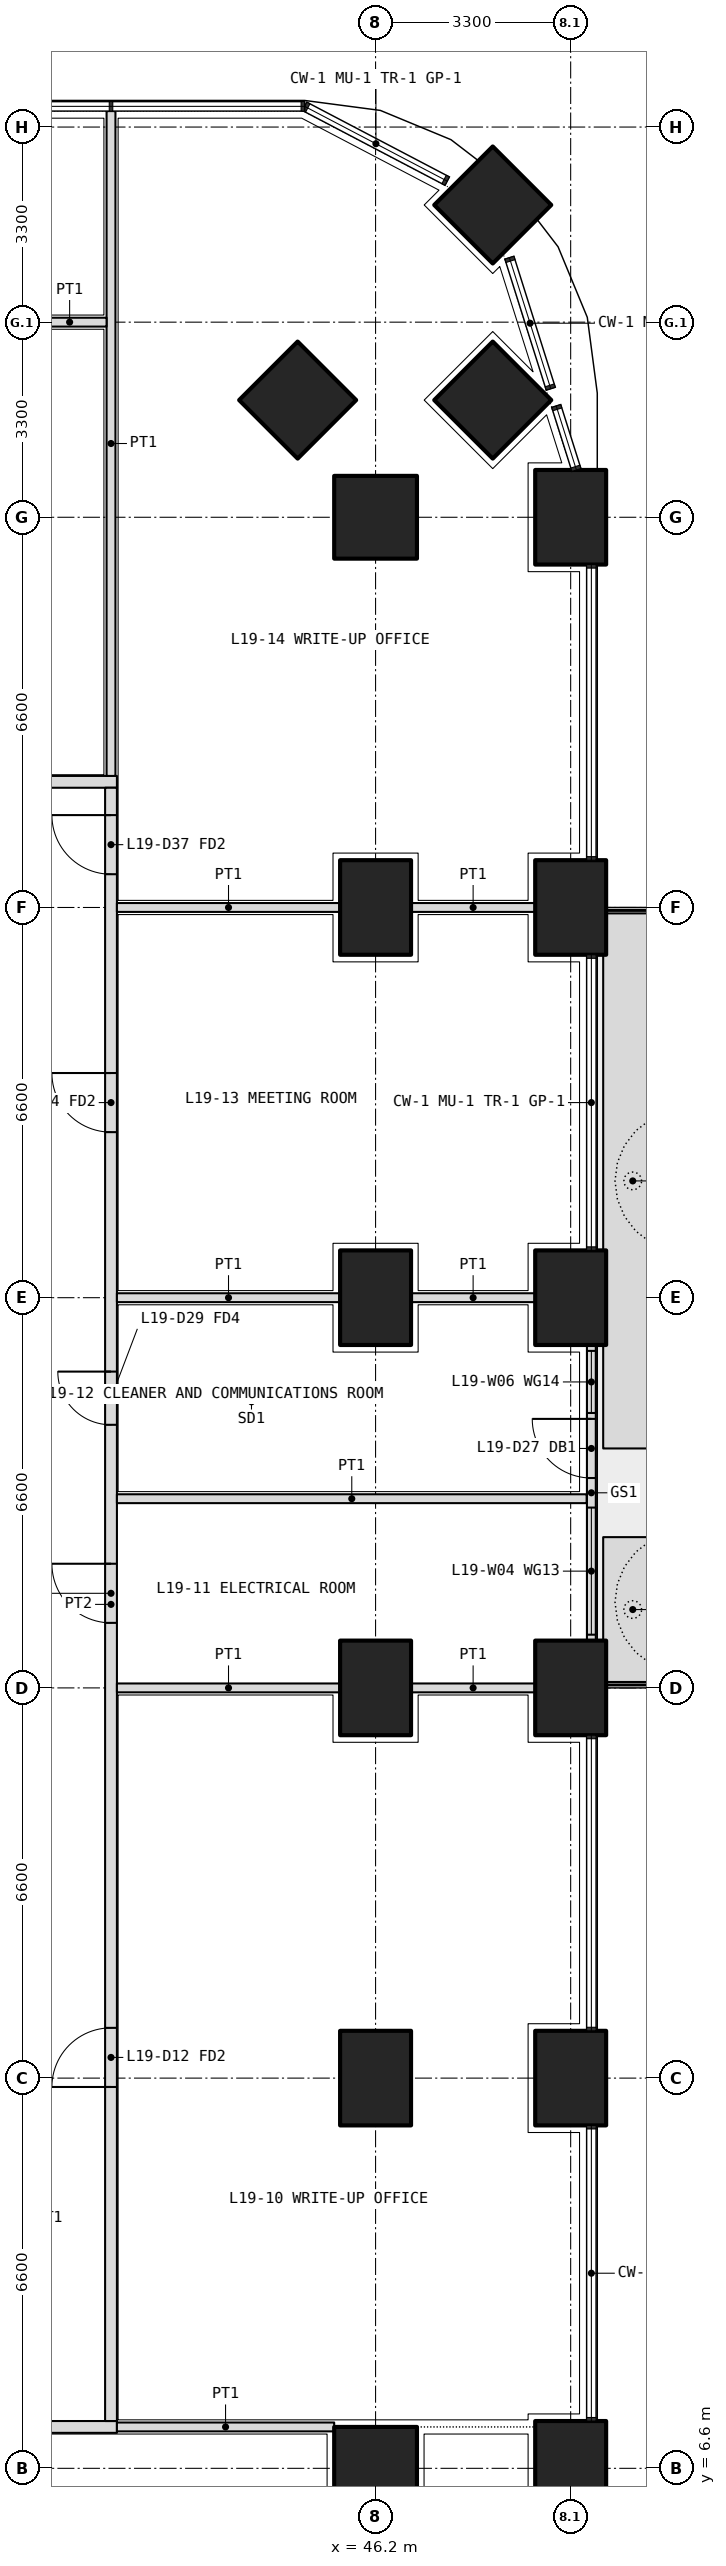
"""IFC4 building model, lengths in metres.
Left out: names, types, materials, properties, quantities, classifications, styles, units other than length and angle.
Written with IfcOpenShell. Run it as: python <this file> out.ifc"""

import sys

from ifc_helpers import new_model, si_unit, direction, frame, frame_2d, origin, origin_2d, place, context, subcontext, project, spatial, polyline, rectangle, outline, extrude, element, fill, save


model = new_model("IFC4")
c1 = context("Model", 3, precision=1e-05, world=origin(), true_north=direction((0.0, 1.0)))
c2 = subcontext(c1, "Body", "Model", "MODEL_VIEW")
j1 = project(units=[si_unit("LENGTHUNIT", "METRE"), si_unit("PLANEANGLEUNIT", "RADIAN")], contexts=[c1])
p1 = place(None, origin())
s1 = spatial("IfcSite", under=j1, at=p1, CompositionType="ELEMENT")
p2 = place(p1, origin())
s2 = spatial("IfcBuilding", under=s1, at=p2, CompositionType="ELEMENT")
p3 = place(p2, frame((0.0, 0.0, 86.4)))
s3 = spatial("IfcBuildingStorey", under=s2, at=p3, CompositionType="ELEMENT", Elevation=86.4)
p4 = place(p3, frame((48.182, 44.882, 0.0), z_axis=(0.0, 0.0, 1.0), x_axis=(0.707106781187, 0.707106781187, 0.0)))
e1 = element("IfcColumn", 1, at=p4, inside=s3, PredefinedType="COLUMN", context=c2, shape_type="SweptSolid", body=[
    extrude(rectangle(XDim=1.4, YDim=1.4, at=origin_2d()), origin(), (0.0, 0.0, 1.0), 4.2),
])
for number, where, z_axis, x_axis in (
    (2, (49.5, 6.6, 0.0), (0.0, 0.0, 1.0), (0.0, 1.0, 0.0)),
    (3, (49.5, 13.2, 0.0), (0.0, 0.0, 1.0), (0.0, 1.0, 0.0)),
    (4, (49.5, 19.8, 0.0), (0.0, 0.0, 1.0), (0.0, 1.0, 0.0)),
    (5, (49.5, 26.4, 0.0), (0.0, 0.0, 1.0), (0.0, 1.0, 0.0)),
    (6, (49.5, 33.0, 0.0), (0.0, 0.0, 1.0), (0.0, 1.0, 0.0)),
    (7, (49.5, 39.6, 0.0), (0.0, 0.0, 1.0), (0.0, 1.0, 0.0)),
):
    element("IfcColumn", number, at=place(p3, frame(where, z_axis=z_axis, x_axis=x_axis)), inside=s3, PredefinedType="COLUMN", context=c2, shape_type="SweptSolid", body=[
        extrude(rectangle(XDim=1.6, YDim=1.2, at=origin_2d()), origin(), (0.0, 0.0, 1.0), 4.2),
    ])
for number, where, z_axis, x_axis in (
    (8, (46.2, 6.6, 0.0), (0.0, 0.0, 1.0), (1.0, 0.0, 0.0)),
    (9, (46.2, 39.6, 0.0), (0.0, 0.0, 1.0), (1.0, 0.0, 0.0)),
    (10, (48.182, 41.582, 0.0), (0.0, 0.0, 1.0), (0.707, 0.707, 0.0)),
    (11, (44.882, 41.582, 0.0), (0.0, 0.0, 1.0), (0.707, 0.707, 0.0)),
):
    element("IfcColumn", number, at=place(p3, frame(where, z_axis=z_axis, x_axis=x_axis)), inside=s3, PredefinedType="COLUMN", context=c2, shape_type="SweptSolid", body=[
        extrude(rectangle(XDim=1.4, YDim=1.4, at=origin_2d()), origin(), (0.0, 0.0, 1.0), 4.2),
    ])
for number, where, z_axis, x_axis in (
    (12, (46.2, 13.2, 0.0), (0.0, 0.0, 1.0), (0.0, 1.0, 0.0)),
    (13, (46.2, 19.8, 0.0), (0.0, 0.0, 1.0), (0.0, 1.0, 0.0)),
    (14, (46.2, 26.4, 0.0), (0.0, 0.0, 1.0), (0.0, 1.0, 0.0)),
    (15, (46.2, 33.0, 0.0), (0.0, 0.0, 1.0), (0.0, 1.0, 0.0)),
):
    element("IfcColumn", number, at=place(p3, frame(where, z_axis=z_axis, x_axis=x_axis)), inside=s3, PredefinedType="COLUMN", context=c2, shape_type="SweptSolid", body=[
        extrude(rectangle(XDim=1.6, YDim=1.2, at=origin_2d()), origin(), (0.0, 0.0, 1.0), 4.2),
    ])
p5 = place(p3, origin())
e16 = element("IfcWall", 16, at=p5, inside=s3, PredefinedType="USERDEFINED", context=c2, shape_type="SweptSolid", body=[
    extrude(outline(polyline([(50.05, 19.9), (51.05, 19.9), (51.05, 22.35), (50.05, 22.35), (50.05, 19.9)]), holes=[polyline([(50.2, 20.05), (50.9, 20.05), (50.9, 22.2), (50.2, 22.2), (50.2, 20.05)])]), origin(), (0.0, 0.0, 1.0), 1.05),
])
p6 = place(p3, origin())
e17 = element("IfcWall", 17, at=p6, inside=s3, PredefinedType="USERDEFINED", context=c2, shape_type="SweptSolid", body=[
    extrude(outline(polyline([(50.05, 23.85), (51.05, 23.85), (51.05, 32.9), (50.05, 32.9), (50.05, 23.85)]), holes=[polyline([(50.2, 24.0), (50.9, 24.0), (50.9, 32.75), (50.2, 32.75), (50.2, 24.0)])]), origin(), (0.0, 0.0, 1.0), 1.05),
])
p7 = place(p3, frame((49.85, 20.6, 0.0), z_axis=(0.0, 0.0, 1.0), x_axis=(0.0, 1.0, 0.0)))
e18 = element("IfcWall", 18, at=p7, inside=s3, PredefinedType="SOLIDWALL", context=c2, shape_type="SweptSolid", body=[
    extrude(rectangle(XDim=5.0, YDim=0.15, at=frame_2d((2.5, 0.0))), origin(), (0.0, 0.0, 1.0), 2.7),
])
p8 = place(p7, frame((2.75, 0.0, 0.0)))
e19 = element("IfcOpeningElement", 19, at=p8, cuts=e18, PredefinedType="OPENING", context=c2, shape_type="SweptSolid", body=[
    extrude(rectangle(XDim=1.0, YDim=2.4, at=frame_2d((0.5, 1.2))), frame((0.0, 0.085, 0.0), z_axis=(0.0, -1.0, 0.0), x_axis=(1.0, 0.0, 0.0)), (0.0, 0.0, 1.0), 0.17),
])
p9 = place(p7, frame((0.1, 0.0, 0.1)))
e20 = element("IfcOpeningElement", 20, at=p9, cuts=e18, PredefinedType="OPENING", context=c2, shape_type="SweptSolid", body=[
    extrude(rectangle(XDim=2.15, YDim=2.3, at=frame_2d((1.075, 1.15))), frame((0.0, 0.085, 0.0), z_axis=(0.0, -1.0, 0.0), x_axis=(1.0, 0.0, 0.0)), (0.0, 0.0, 1.0), 0.17),
])
p10 = place(p7, frame((3.85, 0.0, 0.1)))
e21 = element("IfcOpeningElement", 21, at=p10, cuts=e18, PredefinedType="OPENING", context=c2, shape_type="SweptSolid", body=[
    extrude(rectangle(XDim=1.05, YDim=2.3, at=frame_2d((0.525, 1.15))), frame((0.0, 0.085, 0.0), z_axis=(0.0, -1.0, 0.0), x_axis=(1.0, 0.0, 0.0)), (0.0, 0.0, 1.0), 0.17),
])
p11 = place(p3, frame((26.4, 7.3, 0.0), z_axis=(0.0, 0.0, 1.0), x_axis=(1.0, 0.0, 0.0)))
e22 = element("IfcWall", 22, at=p11, inside=s3, PredefinedType="PARTITIONING", context=c2, shape_type="SweptSolid", body=[
    extrude(rectangle(XDim=15.425, YDim=0.2, at=frame_2d((7.712, 0.0))), origin(), (0.0, 0.0, 1.0), 2.85),
])
p12 = place(p11, frame((7.163, 0.0, 0.0)))
e23 = element("IfcOpeningElement", 23, at=p12, cuts=e22, PredefinedType="OPENING", context=c2, shape_type="SweptSolid", body=[
    extrude(rectangle(XDim=1.0, YDim=2.1, at=frame_2d((0.5, 1.05))), frame((0.0, 0.11, 0.0), z_axis=(0.0, -1.0, 0.0), x_axis=(1.0, 0.0, 0.0)), (0.0, 0.0, 1.0), 0.22),
])
p13 = place(p3, frame((10.975, 35.125, 0.0), z_axis=(0.0, 0.0, 1.0), x_axis=(1.0, 0.0, 0.0)))
e24 = element("IfcWall", 24, at=p13, inside=s3, PredefinedType="PARTITIONING", context=c2, shape_type="SweptSolid", body=[
    extrude(rectangle(XDim=30.85, YDim=0.2, at=frame_2d((15.425, 0.0))), origin(), (0.0, 0.0, 1.0), 2.85),
])
p14 = place(p13, frame((3.962, 0.0, 0.0)))
e25 = element("IfcOpeningElement", 25, at=p14, cuts=e24, PredefinedType="OPENING", context=c2, shape_type="SweptSolid", body=[
    extrude(rectangle(XDim=1.0, YDim=2.1, at=frame_2d((0.5, 1.05))), frame((0.0, 0.11, 0.0), z_axis=(0.0, -1.0, 0.0), x_axis=(1.0, 0.0, 0.0)), (0.0, 0.0, 1.0), 0.22),
])
p15 = place(p13, frame((9.975, 0.0, 0.0)))
e26 = element("IfcOpeningElement", 26, at=p15, cuts=e24, PredefinedType="OPENING", context=c2, shape_type="SweptSolid", body=[
    extrude(rectangle(XDim=1.0, YDim=2.1, at=frame_2d((0.5, 1.05))), frame((0.0, 0.11, 0.0), z_axis=(0.0, -1.0, 0.0), x_axis=(1.0, 0.0, 0.0)), (0.0, 0.0, 1.0), 0.22),
])
p16 = place(p13, frame((14.825, 0.0, 0.0)))
e27 = element("IfcOpeningElement", 27, at=p16, cuts=e24, PredefinedType="OPENING", context=c2, shape_type="SweptSolid", body=[
    extrude(rectangle(XDim=1.2, YDim=2.1, at=frame_2d((0.6, 1.05))), frame((0.0, 0.11, 0.0), z_axis=(0.0, -1.0, 0.0), x_axis=(1.0, 0.0, 0.0)), (0.0, 0.0, 1.0), 0.22),
])
p17 = place(p13, frame((24.238, 0.0, 0.0)))
e28 = element("IfcOpeningElement", 28, at=p17, cuts=e24, PredefinedType="OPENING", context=c2, shape_type="SweptSolid", body=[
    extrude(rectangle(XDim=1.0, YDim=2.1, at=frame_2d((0.5, 1.05))), frame((0.0, 0.11, 0.0), z_axis=(0.0, -1.0, 0.0), x_axis=(1.0, 0.0, 0.0)), (0.0, 0.0, 1.0), 0.22),
])
p18 = place(p3, frame((41.725, 7.4, 0.0), z_axis=(0.0, 0.0, 1.0), x_axis=(0.0, 1.0, 0.0)))
e29 = element("IfcWall", 29, at=p18, inside=s3, PredefinedType="PARTITIONING", context=c2, shape_type="SweptSolid", body=[
    extrude(rectangle(XDim=27.625, YDim=0.2, at=frame_2d((13.812, 0.0))), origin(), (0.0, 0.0, 1.0), 2.85),
])
p19 = place(p18, frame((5.65, 0.0, 0.0)))
e30 = element("IfcOpeningElement", 30, at=p19, cuts=e29, PredefinedType="OPENING", context=c2, shape_type="SweptSolid", body=[
    extrude(rectangle(XDim=1.0, YDim=2.1, at=frame_2d((0.5, 1.05))), frame((0.0, 0.11, 0.0), z_axis=(0.0, -1.0, 0.0), x_axis=(1.0, 0.0, 0.0)), (0.0, 0.0, 1.0), 0.22),
])
p20 = place(p18, frame((13.5, 0.0, 0.0)))
e31 = element("IfcOpeningElement", 31, at=p20, cuts=e29, PredefinedType="OPENING", context=c2, shape_type="SweptSolid", body=[
    extrude(rectangle(XDim=1.0, YDim=2.1, at=frame_2d((0.5, 1.05))), frame((0.0, 0.11, 0.0), z_axis=(0.0, -1.0, 0.0), x_axis=(1.0, 0.0, 0.0)), (0.0, 0.0, 1.0), 0.22),
])
p21 = place(p18, frame((16.85, 0.0, 0.0)))
e32 = element("IfcOpeningElement", 32, at=p21, cuts=e29, PredefinedType="OPENING", context=c2, shape_type="SweptSolid", body=[
    extrude(rectangle(XDim=0.9, YDim=2.1, at=frame_2d((0.45, 1.05))), frame((0.0, 0.11, 0.0), z_axis=(0.0, -1.0, 0.0), x_axis=(1.0, 0.0, 0.0)), (0.0, 0.0, 1.0), 0.22),
])
p22 = place(p18, frame((21.8, 0.0, 0.0)))
e33 = element("IfcOpeningElement", 33, at=p22, cuts=e29, PredefinedType="OPENING", context=c2, shape_type="SweptSolid", body=[
    extrude(rectangle(XDim=1.0, YDim=2.1, at=frame_2d((0.5, 1.05))), frame((0.0, 0.11, 0.0), z_axis=(0.0, -1.0, 0.0), x_axis=(1.0, 0.0, 0.0)), (0.0, 0.0, 1.0), 0.22),
])
p23 = place(p18, frame((26.163, 0.0, 0.0)))
e34 = element("IfcOpeningElement", 34, at=p23, cuts=e29, PredefinedType="OPENING", context=c2, shape_type="SweptSolid", body=[
    extrude(rectangle(XDim=1.0, YDim=2.1, at=frame_2d((0.5, 1.05))), frame((0.0, 0.11, 0.0), z_axis=(0.0, -1.0, 0.0), x_axis=(1.0, 0.0, 0.0)), (0.0, 0.0, 1.0), 0.22),
])
p24 = place(p3, frame((45.5, 7.3, 0.0), z_axis=(0.0, 0.0, 1.0), x_axis=(-1.0, 0.0, 0.0)))
e35 = element("IfcWall", 35, at=p24, inside=s3, PredefinedType="PARTITIONING", context=c2, shape_type="SweptSolid", body=[
    extrude(rectangle(XDim=3.675, YDim=0.15, at=frame_2d((1.837, 0.0))), origin(), (0.0, 0.0, 1.0), 2.85),
])
p25 = place(p3, frame((41.725, 46.47, 0.0), z_axis=(0.0, 0.0, 1.0), x_axis=(0.0, -1.0, 0.0)))
e36 = element("IfcWall", 36, at=p25, inside=s3, PredefinedType="PARTITIONING", context=c2, shape_type="SweptSolid", body=[
    extrude(rectangle(XDim=11.245, YDim=0.15, at=frame_2d((5.623, 0.0))), origin(), (0.0, 0.0, 1.0), 2.7),
])
p26 = place(p3, frame((49.77, 23.0, 0.0), z_axis=(0.0, 0.0, 1.0), x_axis=(-1.0, 0.0, 0.0)))
e37 = element("IfcWall", 37, at=p26, inside=s3, PredefinedType="PARTITIONING", context=c2, shape_type="SweptSolid", body=[
    extrude(rectangle(XDim=7.945, YDim=0.15, at=frame_2d((3.973, 0.0))), origin(), (0.0, 0.0, 1.0), 2.7),
])
p27 = place(p3, frame((48.9, 26.4, 0.0), z_axis=(0.0, 0.0, 1.0), x_axis=(-1.0, 0.0, 0.0)))
e38 = element("IfcWall", 38, at=p27, inside=s3, PredefinedType="PARTITIONING", context=c2, shape_type="SweptSolid", body=[
    extrude(rectangle(XDim=2.1, YDim=0.15, at=frame_2d((1.05, 0.0))), origin(), (0.0, 0.0, 1.0), 2.85),
])
p28 = place(p3, frame((45.6, 26.4, 0.0), z_axis=(0.0, 0.0, 1.0), x_axis=(-1.0, 0.0, 0.0)))
e39 = element("IfcWall", 39, at=p28, inside=s3, PredefinedType="PARTITIONING", context=c2, shape_type="SweptSolid", body=[
    extrude(rectangle(XDim=3.775, YDim=0.15, at=frame_2d((1.888, 0.0))), origin(), (0.0, 0.0, 1.0), 2.85),
])
p29 = place(p3, frame((48.9, 19.8, 0.0), z_axis=(0.0, 0.0, 1.0), x_axis=(-1.0, 0.0, 0.0)))
e40 = element("IfcWall", 40, at=p29, inside=s3, PredefinedType="PARTITIONING", context=c2, shape_type="SweptSolid", body=[
    extrude(rectangle(XDim=2.1, YDim=0.15, at=frame_2d((1.05, 0.0))), origin(), (0.0, 0.0, 1.0), 2.85),
])
p30 = place(p3, frame((45.6, 19.8, 0.0), z_axis=(0.0, 0.0, 1.0), x_axis=(-1.0, 0.0, 0.0)))
e41 = element("IfcWall", 41, at=p30, inside=s3, PredefinedType="PARTITIONING", context=c2, shape_type="SweptSolid", body=[
    extrude(rectangle(XDim=3.775, YDim=0.15, at=frame_2d((1.888, 0.0))), origin(), (0.0, 0.0, 1.0), 2.85),
])
p31 = place(p3, frame((48.9, 33.0, 0.0), z_axis=(0.0, 0.0, 1.0), x_axis=(-1.0, 0.0, 0.0)))
e42 = element("IfcWall", 42, at=p31, inside=s3, PredefinedType="PARTITIONING", context=c2, shape_type="SweptSolid", body=[
    extrude(rectangle(XDim=2.1, YDim=0.15, at=frame_2d((1.05, 0.0))), origin(), (0.0, 0.0, 1.0), 2.85),
])
p32 = place(p3, frame((45.6, 33.0, 0.0), z_axis=(0.0, 0.0, 1.0), x_axis=(-1.0, 0.0, 0.0)))
e43 = element("IfcWall", 43, at=p32, inside=s3, PredefinedType="PARTITIONING", context=c2, shape_type="SweptSolid", body=[
    extrude(rectangle(XDim=3.775, YDim=0.15, at=frame_2d((1.888, 0.0))), origin(), (0.0, 0.0, 1.0), 2.85),
])
p33 = place(p3, frame((41.65, 42.9, 0.0), z_axis=(0.0, 0.0, 1.0), x_axis=(-1.0, 0.0, 0.0)))
e44 = element("IfcWall", 44, at=p33, inside=s3, PredefinedType="PARTITIONING", context=c2, shape_type="SweptSolid", body=[
    extrude(rectangle(XDim=1.25, YDim=0.15, at=frame_2d((0.625, 0.0))), origin(), (0.0, 0.0, 1.0), 3.9),
])
p34 = place(p8, origin())
e45 = element("IfcDoor", 45, at=p34, inside=s3, OperationType="SINGLE_SWING_RIGHT", PredefinedType="DOOR", context=c2, shape_type="SweptSolid", body=[
    extrude(rectangle(XDim=1.0, YDim=2.4, at=frame_2d((0.5, 1.2))), frame((0.0, 0.025, 0.0), z_axis=(0.0, -1.0, 0.0), x_axis=(1.0, 0.0, 0.0)), (0.0, 0.0, 1.0), 0.05),
])
fill(e19, e45)
p35 = place(p9, origin())
e46 = element("IfcWindow", 46, at=p35, inside=s3, PartitioningType="SINGLE_PANEL", PredefinedType="WINDOW", context=c2, shape_type="SweptSolid", body=[
    extrude(rectangle(XDim=2.15, YDim=2.3, at=frame_2d((1.075, 1.15))), frame((0.0, 0.03, 0.0), z_axis=(0.0, -1.0, 0.0), x_axis=(1.0, 0.0, 0.0)), (0.0, 0.0, 1.0), 0.06),
])
fill(e20, e46)
p36 = place(p10, origin())
e47 = element("IfcWindow", 47, at=p36, inside=s3, PartitioningType="SINGLE_PANEL", PredefinedType="WINDOW", context=c2, shape_type="SweptSolid", body=[
    extrude(rectangle(XDim=1.05, YDim=2.3, at=frame_2d((0.525, 1.15))), frame((0.0, 0.03, 0.0), z_axis=(0.0, -1.0, 0.0), x_axis=(1.0, 0.0, 0.0)), (0.0, 0.0, 1.0), 0.06),
])
fill(e21, e47)
p37 = place(p19, origin())
e48 = element("IfcDoor", 48, at=p37, inside=s3, OperationType="SINGLE_SWING_LEFT", PredefinedType="DOOR", context=c2, shape_type="SweptSolid", body=[
    extrude(rectangle(XDim=1.0, YDim=2.1, at=frame_2d((0.5, 1.05))), frame((0.0, 0.025, 0.0), z_axis=(0.0, -1.0, 0.0), x_axis=(1.0, 0.0, 0.0)), (0.0, 0.0, 1.0), 0.05),
])
fill(e30, e48)
p38 = place(p20, origin())
e49 = element("IfcDoor", 49, at=p38, inside=s3, OperationType="SINGLE_SWING_RIGHT", PredefinedType="DOOR", context=c2, shape_type="SweptSolid", body=[
    extrude(rectangle(XDim=1.0, YDim=2.1, at=frame_2d((0.5, 1.05))), frame((0.0, 0.025, 0.0), z_axis=(0.0, -1.0, 0.0), x_axis=(1.0, 0.0, 0.0)), (0.0, 0.0, 1.0), 0.05),
])
fill(e31, e49)
p39 = place(p21, origin())
e50 = element("IfcDoor", 50, at=p39, inside=s3, OperationType="SINGLE_SWING_RIGHT", PredefinedType="DOOR", context=c2, shape_type="SweptSolid", body=[
    extrude(rectangle(XDim=0.9, YDim=2.1, at=frame_2d((0.45, 1.05))), frame((0.0, 0.025, 0.0), z_axis=(0.0, -1.0, 0.0), x_axis=(1.0, 0.0, 0.0)), (0.0, 0.0, 1.0), 0.05),
])
fill(e32, e50)
p40 = place(p22, origin())
e51 = element("IfcDoor", 51, at=p40, inside=s3, OperationType="SINGLE_SWING_RIGHT", PredefinedType="DOOR", context=c2, shape_type="SweptSolid", body=[
    extrude(rectangle(XDim=1.0, YDim=2.1, at=frame_2d((0.5, 1.05))), frame((0.0, 0.025, 0.0), z_axis=(0.0, -1.0, 0.0), x_axis=(1.0, 0.0, 0.0)), (0.0, 0.0, 1.0), 0.05),
])
fill(e33, e51)
p41 = place(p23, origin())
e52 = element("IfcDoor", 52, at=p41, inside=s3, OperationType="SINGLE_SWING_RIGHT", PredefinedType="DOOR", context=c2, shape_type="SweptSolid", body=[
    extrude(rectangle(XDim=1.0, YDim=2.1, at=frame_2d((0.5, 1.05))), frame((0.0, 0.025, 0.0), z_axis=(0.0, -1.0, 0.0), x_axis=(1.0, 0.0, 0.0)), (0.0, 0.0, 1.0), 0.05),
])
fill(e34, e52)
save(model, sys.argv[1])
